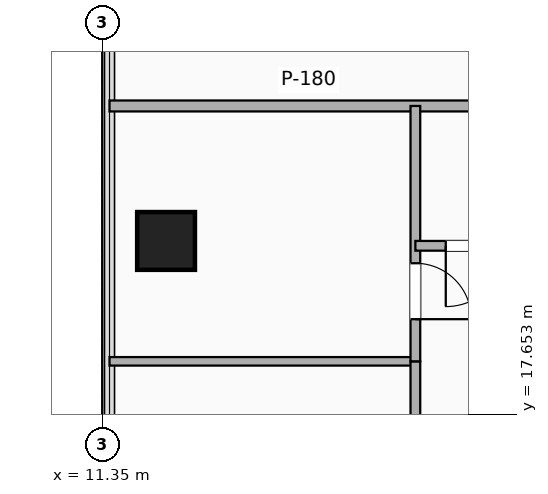
"""IFC4 building model, lengths in metres.
Left out: names, types, materials, properties, quantities, classifications, styles, units other than length and angle.
Written with IfcOpenShell. Run it as: python <this file> out.ifc"""

import sys

from ifc_helpers import new_model, si_unit, direction, frame, frame_2d, origin, origin_2d, place, context, subcontext, project, spatial, rectangle, extrude, element, fill, save


model = new_model("IFC4")
c1 = context("Model", 3, precision=1e-05, world=origin(), true_north=direction((0.0, 1.0)))
c2 = subcontext(c1, "Body", "Model", "MODEL_VIEW")
j1 = project(units=[si_unit("LENGTHUNIT", "METRE"), si_unit("PLANEANGLEUNIT", "RADIAN")], contexts=[c1])
p1 = place(None, origin())
s1 = spatial("IfcSite", under=j1, at=p1, CompositionType="ELEMENT")
p2 = place(p1, origin())
s2 = spatial("IfcBuilding", under=s1, at=p2, CompositionType="ELEMENT")
p3 = place(p2, frame((0.0, 0.0, 192.5)))
s3 = spatial("IfcBuildingStorey", under=s2, at=p3, CompositionType="ELEMENT", Elevation=192.5)
p4 = place(p3, frame((12.4, 20.5, -0.24), z_axis=(0.0, 0.0, 1.0), x_axis=(1.0, 0.0, 0.0)))
e1 = element("IfcColumn", 1, at=p4, inside=s3, PredefinedType="COLUMN", context=c2, shape_type="SweptSolid", body=[
    extrude(rectangle(XDim=0.95, YDim=0.95, at=origin_2d()), origin(), (0.0, 0.0, 1.0), 4.4),
])
p5 = place(p3, frame((11.47, 22.72, 0.0), z_axis=(0.0, 0.0, 1.0), x_axis=(1.0, 0.0, 0.0)))
e2 = element("IfcWall", 2, at=p5, inside=s3, PredefinedType="PARTITIONING", context=c2, shape_type="SweptSolid", body=[
    extrude(rectangle(XDim=6.55, YDim=0.18, at=frame_2d((3.275, 0.0))), origin(), (0.0, 0.0, 1.0), 3.682),
])
p6 = place(p3, frame((11.47, 18.52, 0.0), z_axis=(0.0, 0.0, 1.0), x_axis=(1.0, 0.0, 0.0)))
e3 = element("IfcWall", 3, at=p6, inside=s3, PredefinedType="PARTITIONING", context=c2, shape_type="SweptSolid", body=[
    extrude(rectangle(XDim=5.03, YDim=0.14, at=frame_2d((2.515, 0.0))), origin(), (0.0, 0.0, 1.0), 3.682),
])
p7 = place(p3, frame((16.5, 14.58, 0.0), z_axis=(0.0, 0.0, 1.0), x_axis=(0.0, 1.0, 0.0)))
e4 = element("IfcWall", 4, at=p7, inside=s3, PredefinedType="PARTITIONING", context=c2, shape_type="SweptSolid", body=[
    extrude(rectangle(XDim=3.94, YDim=0.16, at=frame_2d((1.97, 0.0))), origin(), (0.0, 0.0, 1.0), 3.898),
])
p8 = place(p7, frame((1.4, 0.0, 0.0)))
e5 = element("IfcOpeningElement", 5, at=p8, cuts=e4, PredefinedType="OPENING", context=c2, shape_type="SweptSolid", body=[
    extrude(rectangle(XDim=0.92, YDim=2.08, at=frame_2d((0.46, 1.04))), frame((0.0, 0.09, 0.0), z_axis=(0.0, -1.0, 0.0), x_axis=(1.0, 0.0, 0.0)), (0.0, 0.0, 1.0), 0.18),
])
p9 = place(p3, frame((16.5, 18.52, 0.0), z_axis=(0.0, 0.0, 1.0), x_axis=(0.0, 1.0, 0.0)))
e6 = element("IfcWall", 6, at=p9, inside=s3, PredefinedType="PARTITIONING", context=c2, shape_type="SweptSolid", body=[
    extrude(rectangle(XDim=4.2, YDim=0.16, at=frame_2d((2.1, 0.0))), origin(), (0.0, 0.0, 1.0), 3.372),
])
p10 = place(p9, frame((0.693, 0.0, 0.0)))
e7 = element("IfcOpeningElement", 7, at=p10, cuts=e6, PredefinedType="OPENING", context=c2, shape_type="SweptSolid", body=[
    extrude(rectangle(XDim=0.92, YDim=2.08, at=frame_2d((0.46, 1.04))), frame((0.0, 0.09, 0.0), z_axis=(0.0, -1.0, 0.0), x_axis=(1.0, 0.0, 0.0)), (0.0, 0.0, 1.0), 0.18),
])
p11 = place(p3, frame((16.5, 20.42, 0.0), z_axis=(0.0, 0.0, 1.0), x_axis=(1.0, 0.0, 0.0)))
e8 = element("IfcWall", 8, at=p11, inside=s3, PredefinedType="PARTITIONING", context=c2, shape_type="SweptSolid", body=[
    extrude(rectangle(XDim=2.1, YDim=0.16, at=frame_2d((1.05, 0.0))), origin(), (0.0, 0.0, 1.0), 3.372),
])
p12 = place(p11, frame((0.5, 0.0, 0.0)))
e9 = element("IfcOpeningElement", 9, at=p12, cuts=e8, PredefinedType="OPENING", context=c2, shape_type="SweptSolid", body=[
    extrude(rectangle(XDim=1.0, YDim=2.15, at=frame_2d((0.5, 1.075))), frame((0.0, 0.09, 0.0), z_axis=(0.0, -1.0, 0.0), x_axis=(1.0, 0.0, 0.0)), (0.0, 0.0, 1.0), 0.18),
])
p13 = place(p10, origin())
e10 = element("IfcDoor", 10, at=p13, inside=s3, OperationType="SINGLE_SWING_LEFT", PredefinedType="DOOR", context=c2, shape_type="SweptSolid", body=[
    extrude(rectangle(XDim=0.92, YDim=2.08, at=frame_2d((0.46, 1.04))), frame((0.0, 0.025, 0.0), z_axis=(0.0, -1.0, 0.0), x_axis=(1.0, 0.0, 0.0)), (0.0, 0.0, 1.0), 0.05),
])
fill(e7, e10)
p14 = place(p12, origin())
e11 = element("IfcDoor", 11, at=p14, inside=s3, OperationType="SINGLE_SWING_LEFT", PredefinedType="DOOR", context=c2, shape_type="SweptSolid", body=[
    extrude(rectangle(XDim=1.0, YDim=2.15, at=frame_2d((0.5, 1.075))), frame((0.0, 0.025, 0.0), z_axis=(0.0, -1.0, 0.0), x_axis=(1.0, 0.0, 0.0)), (0.0, 0.0, 1.0), 0.05),
])
fill(e9, e11)
save(model, sys.argv[1])
